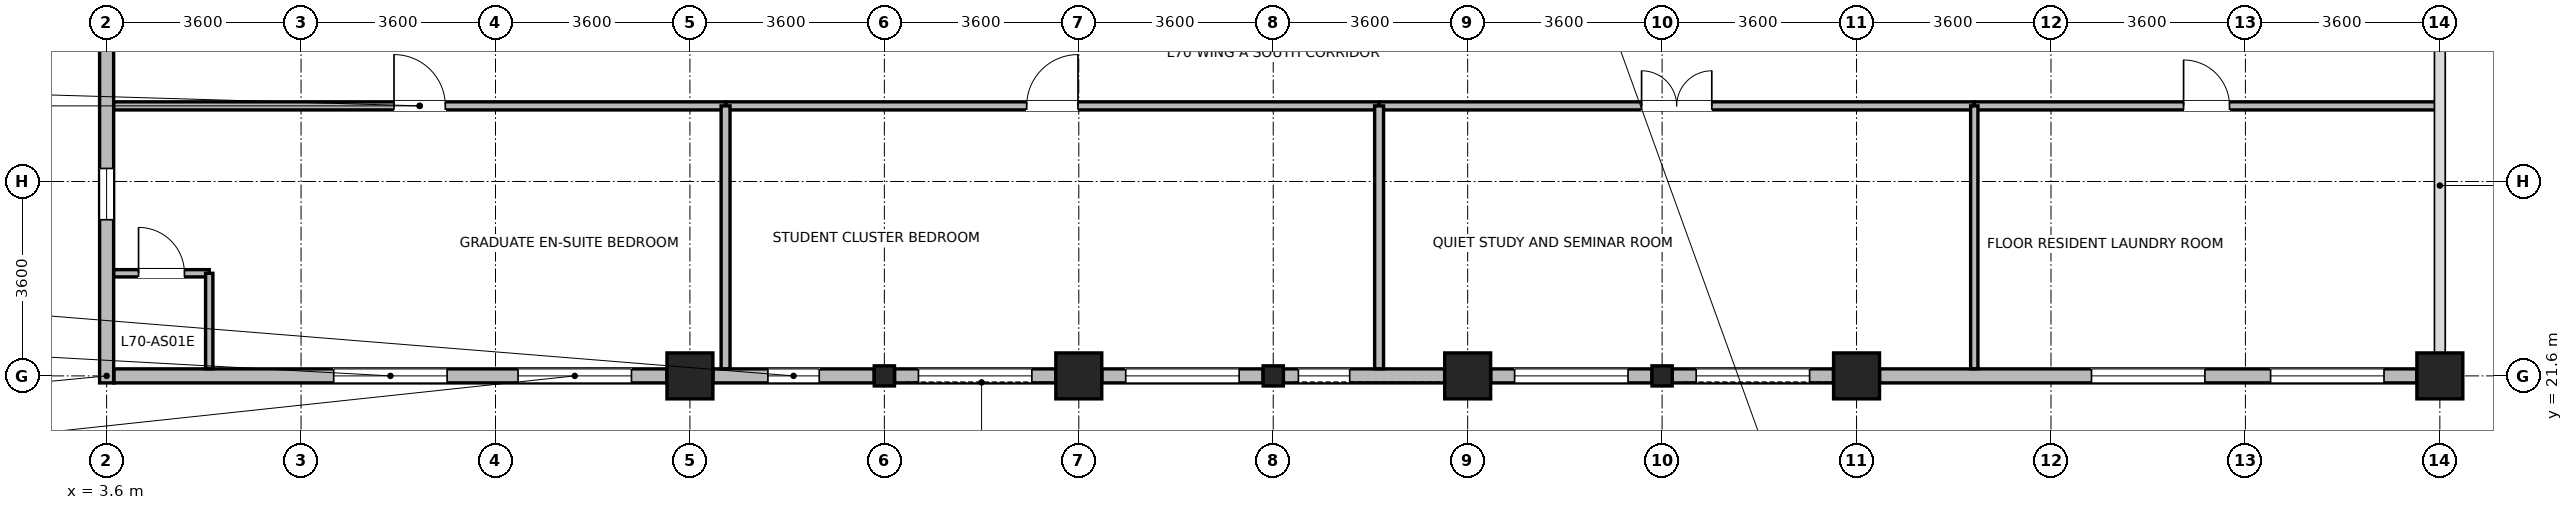
"""IFC4 building model, lengths in metres.
Left out: names, types, materials, properties, quantities, classifications, styles, units other than length and angle.
Written with IfcOpenShell. Run it as: python <this file> out.ifc"""

import sys

from ifc_helpers import new_model, si_unit, direction, frame, frame_2d, origin, origin_2d, place, context, subcontext, project, spatial, rectangle, i_section, extrude, source, transform, mapped, element, fill, save


model = new_model("IFC4")
c1 = context("Model", 3, precision=1e-05, world=origin(), true_north=direction((0.0, 1.0)))
c2 = subcontext(c1, "Body", "Model", "MODEL_VIEW")
j1 = project(units=[si_unit("LENGTHUNIT", "METRE"), si_unit("PLANEANGLEUNIT", "RADIAN")], contexts=[c1])
p1 = place(None, origin())
s1 = spatial("IfcSite", under=j1, at=p1, CompositionType="ELEMENT")
p2 = place(p1, origin())
s2 = spatial("IfcBuilding", under=s1, at=p2, CompositionType="ELEMENT")
p3 = place(p2, frame((0.0, 0.0, 272.1)))
s3 = spatial("IfcBuildingStorey", under=s2, at=p3, CompositionType="ELEMENT", Elevation=272.1)
m1 = source(origin(), c2, "Body", "SweptSolid", [
    extrude(rectangle(XDim=0.85, YDim=0.85, at=origin_2d()), origin(), (0.0, 0.0, 1.0), 3.7),
])
for number, where, z_axis, x_axis in (
    (1, (14.4, 21.6, 0.0), (0.0, 0.0, 1.0), (1.0, 0.0, 0.0)),
    (2, (21.6, 21.6, 0.0), (0.0, 0.0, 1.0), (1.0, 0.0, 0.0)),
    (3, (28.8, 21.6, 0.0), (0.0, 0.0, 1.0), (1.0, 0.0, 0.0)),
    (4, (36.0, 21.6, 0.0), (0.0, 0.0, 1.0), (1.0, 0.0, 0.0)),
    (5, (46.8, 21.6, 0.0), (0.0, 0.0, 1.0), (1.0, 0.0, 0.0)),
):
    element("IfcColumn", number, at=place(p3, frame(where, z_axis=z_axis, x_axis=x_axis)), inside=s3, PredefinedType="COLUMN", context=c2, shape_type="MappedRepresentation", body=[
        mapped(m1, transform((0.0, 0.0, 0.0), x_axis=(1.0, 0.0, 0.0), y_axis=(0.0, 1.0, 0.0), z_axis=(0.0, 0.0, 1.0), scale=1.0)),
    ])
m2 = source(origin(), c2, "Body", "SweptSolid", [
    extrude(i_section(OverallWidth=0.374, OverallDepth=0.372, WebThickness=0.015, FlangeThickness=0.026, FilletRadius=0.015, at=origin_2d()), origin(), (0.0, 0.0, 1.0), 3.7),
])
for number, where, z_axis, x_axis in (
    (6, (18.0, 21.6, 0.0), (0.0, 0.0, 1.0), (1.0, 0.0, 0.0)),
    (7, (25.2, 21.6, 0.0), (0.0, 0.0, 1.0), (1.0, 0.0, 0.0)),
    (8, (32.4, 21.6, 0.0), (0.0, 0.0, 1.0), (1.0, 0.0, 0.0)),
):
    element("IfcColumn", number, at=place(p3, frame(where, z_axis=z_axis, x_axis=x_axis)), inside=s3, PredefinedType="COLUMN", context=c2, shape_type="MappedRepresentation", body=[
        mapped(m2, transform((0.0, 0.0, 0.0), x_axis=(1.0, 0.0, 0.0), y_axis=(0.0, 1.0, 0.0), z_axis=(0.0, 0.0, 1.0), scale=1.0)),
    ])
p4 = place(p3, frame((13.974, 21.6, 0.0), z_axis=(0.0, 0.0, 1.0), x_axis=(-1.0, 0.0, 0.0)))
e9 = element("IfcWall", 9, at=p4, inside=s3, PredefinedType="STANDARD", context=c2, shape_type="SweptSolid", body=[
    extrude(rectangle(XDim=10.239, YDim=0.26, at=frame_2d((5.12, 0.0))), origin(), (0.0, 0.0, 1.0), 3.455),
])
p5 = place(p4, frame((0.656, 0.0, 0.85)))
e10 = element("IfcOpeningElement", 10, at=p5, cuts=e9, PredefinedType="OPENING", context=c2, shape_type="SweptSolid", body=[
    extrude(rectangle(XDim=2.1, YDim=1.95, at=frame_2d((1.05, 0.975))), frame((0.0, 0.14, 0.0), z_axis=(0.0, -1.0, 0.0), x_axis=(1.0, 0.0, 0.0)), (0.0, 0.0, 1.0), 0.28),
])
p6 = place(p4, frame((4.07, 0.0, 0.85)))
e11 = element("IfcOpeningElement", 11, at=p6, cuts=e9, PredefinedType="OPENING", context=c2, shape_type="SweptSolid", body=[
    extrude(rectangle(XDim=2.1, YDim=1.95, at=frame_2d((1.05, 0.975))), frame((0.0, 0.14, 0.0), z_axis=(0.0, -1.0, 0.0), x_axis=(1.0, 0.0, 0.0)), (0.0, 0.0, 1.0), 0.28),
])
p7 = place(p3, frame((17.812, 21.6, 0.0), z_axis=(0.0, 0.0, 1.0), x_axis=(-1.0, 0.0, 0.0)))
e12 = element("IfcWall", 12, at=p7, inside=s3, PredefinedType="STANDARD", context=c2, shape_type="SweptSolid", body=[
    extrude(rectangle(XDim=2.986, YDim=0.26, at=frame_2d((1.493, 0.0))), origin(), (0.0, 0.0, 1.0), 3.055),
])
p8 = place(p7, frame((1.018, 0.0, 0.85)))
e13 = element("IfcOpeningElement", 13, at=p8, cuts=e12, PredefinedType="OPENING", context=c2, shape_type="SweptSolid", body=[
    extrude(rectangle(XDim=0.95, YDim=1.75, at=frame_2d((0.475, 0.875))), frame((0.0, 0.14, 0.0), z_axis=(0.0, -1.0, 0.0), x_axis=(1.0, 0.0, 0.0)), (0.0, 0.0, 1.0), 0.28),
])
p9 = place(p3, frame((21.174, 21.6, 0.0), z_axis=(0.0, 0.0, 1.0), x_axis=(-1.0, 0.0, 0.0)))
e14 = element("IfcWall", 14, at=p9, inside=s3, PredefinedType="STANDARD", context=c2, shape_type="SweptSolid", body=[
    extrude(rectangle(XDim=2.986, YDim=0.26, at=frame_2d((1.493, 0.0))), origin(), (0.0, 0.0, 1.0), 3.055),
])
p10 = place(p9, frame((0.443, 0.0, 0.85)))
e15 = element("IfcOpeningElement", 15, at=p10, cuts=e14, PredefinedType="OPENING", context=c2, shape_type="SweptSolid", body=[
    extrude(rectangle(XDim=2.1, YDim=1.95, at=frame_2d((1.05, 0.975))), frame((0.0, 0.14, 0.0), z_axis=(0.0, -1.0, 0.0), x_axis=(1.0, 0.0, 0.0)), (0.0, 0.0, 1.0), 0.28),
])
p11 = place(p3, frame((25.012, 21.6, 0.0), z_axis=(0.0, 0.0, 1.0), x_axis=(-1.0, 0.0, 0.0)))
e16 = element("IfcWall", 16, at=p11, inside=s3, PredefinedType="STANDARD", context=c2, shape_type="SweptSolid", body=[
    extrude(rectangle(XDim=2.986, YDim=0.26, at=frame_2d((1.493, 0.0))), origin(), (0.0, 0.0, 1.0), 3.055),
])
p12 = place(p11, frame((0.443, 0.0, 0.85)))
e17 = element("IfcOpeningElement", 17, at=p12, cuts=e16, PredefinedType="OPENING", context=c2, shape_type="SweptSolid", body=[
    extrude(rectangle(XDim=2.1, YDim=1.95, at=frame_2d((1.05, 0.975))), frame((0.0, 0.14, 0.0), z_axis=(0.0, -1.0, 0.0), x_axis=(1.0, 0.0, 0.0)), (0.0, 0.0, 1.0), 0.28),
])
p13 = place(p3, frame((28.374, 21.6, 0.0), z_axis=(0.0, 0.0, 1.0), x_axis=(-1.0, 0.0, 0.0)))
e18 = element("IfcWall", 18, at=p13, inside=s3, PredefinedType="STANDARD", context=c2, shape_type="SweptSolid", body=[
    extrude(rectangle(XDim=2.986, YDim=0.26, at=frame_2d((1.493, 0.0))), origin(), (0.0, 0.0, 1.0), 3.055),
])
p14 = place(p13, frame((1.759, 0.0, 0.85)))
e19 = element("IfcOpeningElement", 19, at=p14, cuts=e18, PredefinedType="OPENING", context=c2, shape_type="SweptSolid", body=[
    extrude(rectangle(XDim=0.95, YDim=1.75, at=frame_2d((0.475, 0.875))), frame((0.0, 0.14, 0.0), z_axis=(0.0, -1.0, 0.0), x_axis=(1.0, 0.0, 0.0)), (0.0, 0.0, 1.0), 0.28),
])
p15 = place(p3, frame((32.212, 21.6, 0.0), z_axis=(0.0, 0.0, 1.0), x_axis=(-1.0, 0.0, 0.0)))
e20 = element("IfcWall", 20, at=p15, inside=s3, PredefinedType="STANDARD", context=c2, shape_type="SweptSolid", body=[
    extrude(rectangle(XDim=2.986, YDim=0.26, at=frame_2d((1.493, 0.0))), origin(), (0.0, 0.0, 1.0), 3.055),
])
p16 = place(p15, frame((0.443, 0.0, 0.85)))
e21 = element("IfcOpeningElement", 21, at=p16, cuts=e20, PredefinedType="OPENING", context=c2, shape_type="SweptSolid", body=[
    extrude(rectangle(XDim=2.1, YDim=1.95, at=frame_2d((1.05, 0.975))), frame((0.0, 0.14, 0.0), z_axis=(0.0, -1.0, 0.0), x_axis=(1.0, 0.0, 0.0)), (0.0, 0.0, 1.0), 0.28),
])
p17 = place(p3, frame((35.574, 21.6, 0.0), z_axis=(0.0, 0.0, 1.0), x_axis=(-1.0, 0.0, 0.0)))
e22 = element("IfcWall", 22, at=p17, inside=s3, PredefinedType="STANDARD", context=c2, shape_type="SweptSolid", body=[
    extrude(rectangle(XDim=2.986, YDim=0.26, at=frame_2d((1.493, 0.0))), origin(), (0.0, 0.0, 1.0), 3.055),
])
p18 = place(p17, frame((0.443, 0.0, 0.85)))
e23 = element("IfcOpeningElement", 23, at=p18, cuts=e22, PredefinedType="OPENING", context=c2, shape_type="SweptSolid", body=[
    extrude(rectangle(XDim=2.1, YDim=1.95, at=frame_2d((1.05, 0.975))), frame((0.0, 0.14, 0.0), z_axis=(0.0, -1.0, 0.0), x_axis=(1.0, 0.0, 0.0)), (0.0, 0.0, 1.0), 0.28),
])
p19 = place(p3, frame((46.374, 21.6, 0.0), z_axis=(0.0, 0.0, 1.0), x_axis=(-1.0, 0.0, 0.0)))
e24 = element("IfcWall", 24, at=p19, inside=s3, PredefinedType="STANDARD", context=c2, shape_type="SweptSolid", body=[
    extrude(rectangle(XDim=9.948, YDim=0.26, at=frame_2d((4.974, 0.0))), origin(), (0.0, 0.0, 1.0), 3.055),
])
p20 = place(p19, frame((0.608, 0.0, 0.85)))
e25 = element("IfcOpeningElement", 25, at=p20, cuts=e24, PredefinedType="OPENING", context=c2, shape_type="SweptSolid", body=[
    extrude(rectangle(XDim=2.1, YDim=1.95, at=frame_2d((1.05, 0.975))), frame((0.0, 0.14, 0.0), z_axis=(0.0, -1.0, 0.0), x_axis=(1.0, 0.0, 0.0)), (0.0, 0.0, 1.0), 0.28),
])
p21 = place(p19, frame((3.924, 0.0, 0.85)))
e26 = element("IfcOpeningElement", 26, at=p21, cuts=e24, PredefinedType="OPENING", context=c2, shape_type="SweptSolid", body=[
    extrude(rectangle(XDim=2.1, YDim=1.95, at=frame_2d((1.05, 0.975))), frame((0.0, 0.14, 0.0), z_axis=(0.0, -1.0, 0.0), x_axis=(1.0, 0.0, 0.0)), (0.0, 0.0, 1.0), 0.28),
])
p22 = place(p3, frame((3.6, 21.47, 0.0), z_axis=(0.0, 0.0, 1.0), x_axis=(0.0, 1.0, 0.0)))
e27 = element("IfcWall", 27, at=p22, inside=s3, PredefinedType="STANDARD", context=c2, shape_type="SweptSolid", body=[
    extrude(rectangle(XDim=6.993, YDim=0.26, at=frame_2d((3.497, 0.0))), origin(), (0.0, 0.0, 1.0), 3.455),
])
p23 = place(p22, frame((3.021, 0.0, 0.85)))
e28 = element("IfcOpeningElement", 28, at=p23, cuts=e27, PredefinedType="OPENING", context=c2, shape_type="SweptSolid", body=[
    extrude(rectangle(XDim=0.95, YDim=1.75, at=frame_2d((0.475, 0.875))), frame((0.0, 0.14, 0.0), z_axis=(0.0, -1.0, 0.0), x_axis=(1.0, 0.0, 0.0)), (0.0, 0.0, 1.0), 0.28),
])
p24 = place(p3, frame((3.732, 23.5, 0.0), z_axis=(0.0, 0.0, 1.0), x_axis=(1.0, 0.0, 0.0)))
e29 = element("IfcWall", 29, at=p24, inside=s3, PredefinedType="PARTITIONING", context=c2, shape_type="SweptSolid", body=[
    extrude(rectangle(XDim=1.768, YDim=0.135, at=frame_2d((0.884, 0.0))), origin(), (0.0, 0.0, 1.0), 3.455),
])
p25 = place(p24, frame((0.459, 0.0, 0.0)))
e30 = element("IfcOpeningElement", 30, at=p25, cuts=e29, PredefinedType="OPENING", context=c2, shape_type="SweptSolid", body=[
    extrude(rectangle(XDim=0.85, YDim=2.04, at=frame_2d((0.425, 1.02))), frame((0.0, 0.078, 0.0), z_axis=(0.0, -1.0, 0.0), x_axis=(1.0, 0.0, 0.0)), (0.0, 0.0, 1.0), 0.155),
])
p26 = place(p3, frame((5.5, 21.732, 0.0), z_axis=(0.0, 0.0, 1.0), x_axis=(0.0, 1.0, 0.0)))
e31 = element("IfcWall", 31, at=p26, inside=s3, PredefinedType="PARTITIONING", context=c2, shape_type="SweptSolid", body=[
    extrude(rectangle(XDim=1.768, YDim=0.135, at=frame_2d((0.884, 0.0))), origin(), (0.0, 0.0, 1.0), 3.455),
])
p27 = place(p3, frame((15.06, 26.6, 0.0), z_axis=(0.0, 0.0, 1.0), x_axis=(1.0, 0.0, 0.0)))
e32 = element("IfcWall", 32, at=p27, inside=s3, PredefinedType="PARTITIONING", context=c2, shape_type="SweptSolid", body=[
    extrude(rectangle(XDim=12.1, YDim=0.15, at=frame_2d((6.05, 0.0))), origin(), (0.0, 0.0, 1.0), 3.455),
])
p28 = place(p27, frame((5.575, 0.0, 0.0)))
e33 = element("IfcOpeningElement", 33, at=p28, cuts=e32, PredefinedType="OPENING", context=c2, shape_type="SweptSolid", body=[
    extrude(rectangle(XDim=0.95, YDim=2.1, at=frame_2d((0.475, 1.05))), frame((0.0, 0.085, 0.0), z_axis=(0.0, -1.0, 0.0), x_axis=(1.0, 0.0, 0.0)), (0.0, 0.0, 1.0), 0.17),
])
p29 = place(p3, frame((3.732, 26.6, 0.0), z_axis=(0.0, 0.0, 1.0), x_axis=(1.0, 0.0, 0.0)))
e34 = element("IfcWall", 34, at=p29, inside=s3, PredefinedType="PARTITIONING", context=c2, shape_type="SweptSolid", body=[
    extrude(rectangle(XDim=11.328, YDim=0.15, at=frame_2d((5.664, 0.0))), origin(), (0.0, 0.0, 1.0), 3.455),
])
p30 = place(p29, frame((5.189, 0.0, 0.0)))
e35 = element("IfcOpeningElement", 35, at=p30, cuts=e34, PredefinedType="OPENING", context=c2, shape_type="SweptSolid", body=[
    extrude(rectangle(XDim=0.95, YDim=2.1, at=frame_2d((0.475, 1.05))), frame((0.0, 0.085, 0.0), z_axis=(0.0, -1.0, 0.0), x_axis=(1.0, 0.0, 0.0)), (0.0, 0.0, 1.0), 0.17),
])
p31 = place(p3, frame((27.16, 26.6, 0.0), z_axis=(0.0, 0.0, 1.0), x_axis=(1.0, 0.0, 0.0)))
e36 = element("IfcWall", 36, at=p31, inside=s3, PredefinedType="PARTITIONING", context=c2, shape_type="SweptSolid", body=[
    extrude(rectangle(XDim=11.02, YDim=0.15, at=frame_2d((5.51, 0.0))), origin(), (0.0, 0.0, 1.0), 3.455),
])
p32 = place(p31, frame((4.86, 0.0, 0.0)))
e37 = element("IfcOpeningElement", 37, at=p32, cuts=e36, PredefinedType="OPENING", context=c2, shape_type="SweptSolid", body=[
    extrude(rectangle(XDim=1.3, YDim=2.12, at=frame_2d((0.65, 1.06))), frame((0.0, 0.085, 0.0), z_axis=(0.0, -1.0, 0.0), x_axis=(1.0, 0.0, 0.0)), (0.0, 0.0, 1.0), 0.17),
])
p33 = place(p3, frame((38.18, 26.6, 0.0), z_axis=(0.0, 0.0, 1.0), x_axis=(1.0, 0.0, 0.0)))
e38 = element("IfcWall", 38, at=p33, inside=s3, PredefinedType="PARTITIONING", context=c2, shape_type="SweptSolid", body=[
    extrude(rectangle(XDim=8.6, YDim=0.15, at=frame_2d((4.3, 0.0))), origin(), (0.0, 0.0, 1.0), 3.455),
])
p34 = place(p33, frame((3.875, 0.0, 0.0)))
e39 = element("IfcOpeningElement", 39, at=p34, cuts=e38, PredefinedType="OPENING", context=c2, shape_type="SweptSolid", body=[
    extrude(rectangle(XDim=0.85, YDim=2.04, at=frame_2d((0.425, 1.02))), frame((0.0, 0.085, 0.0), z_axis=(0.0, -1.0, 0.0), x_axis=(1.0, 0.0, 0.0)), (0.0, 0.0, 1.0), 0.17),
])
for number, where, z_axis, x_axis in (
    (40, (15.06, 21.732, 0.0), (0.0, 0.0, 1.0), (0.0, 1.0, 0.0)),
    (41, (27.16, 21.732, 0.0), (0.0, 0.0, 1.0), (0.0, 1.0, 0.0)),
):
    element("IfcWall", number, at=place(p3, frame(where, z_axis=z_axis, x_axis=x_axis)), inside=s3, PredefinedType="PARTITIONING", context=c2, shape_type="SweptSolid", body=[
        extrude(rectangle(XDim=4.868, YDim=0.165, at=frame_2d((2.434, 0.0))), origin(), (0.0, 0.0, 1.0), 3.455),
    ])
p35 = place(p3, frame((38.18, 21.732, 0.0), z_axis=(0.0, 0.0, 1.0), x_axis=(0.0, 1.0, 0.0)))
e42 = element("IfcWall", 42, at=p35, inside=s3, PredefinedType="PARTITIONING", context=c2, shape_type="SweptSolid", body=[
    extrude(rectangle(XDim=4.868, YDim=0.135, at=frame_2d((2.434, 0.0))), origin(), (0.0, 0.0, 1.0), 3.455),
])
p36 = place(p5, origin())
e43 = element("IfcWindow", 43, at=p36, inside=s3, PartitioningType="SINGLE_PANEL", PredefinedType="WINDOW", context=c2, shape_type="SweptSolid", body=[
    extrude(rectangle(XDim=2.1, YDim=1.95, at=frame_2d((1.05, 0.975))), frame((0.0, 0.03, 0.0), z_axis=(0.0, -1.0, 0.0), x_axis=(1.0, 0.0, 0.0)), (0.0, 0.0, 1.0), 0.06),
])
fill(e10, e43)
p37 = place(p6, origin())
e44 = element("IfcWindow", 44, at=p37, inside=s3, PartitioningType="SINGLE_PANEL", PredefinedType="WINDOW", context=c2, shape_type="SweptSolid", body=[
    extrude(rectangle(XDim=2.1, YDim=1.95, at=frame_2d((1.05, 0.975))), frame((0.0, 0.03, 0.0), z_axis=(0.0, -1.0, 0.0), x_axis=(1.0, 0.0, 0.0)), (0.0, 0.0, 1.0), 0.06),
])
fill(e11, e44)
p38 = place(p8, origin())
e45 = element("IfcWindow", 45, at=p38, inside=s3, PartitioningType="SINGLE_PANEL", PredefinedType="WINDOW", context=c2, shape_type="SweptSolid", body=[
    extrude(rectangle(XDim=0.95, YDim=1.75, at=frame_2d((0.475, 0.875))), frame((0.0, 0.03, 0.0), z_axis=(0.0, -1.0, 0.0), x_axis=(1.0, 0.0, 0.0)), (0.0, 0.0, 1.0), 0.06),
])
fill(e13, e45)
p39 = place(p10, origin())
e46 = element("IfcWindow", 46, at=p39, inside=s3, PartitioningType="SINGLE_PANEL", PredefinedType="WINDOW", context=c2, shape_type="SweptSolid", body=[
    extrude(rectangle(XDim=2.1, YDim=1.95, at=frame_2d((1.05, 0.975))), frame((0.0, 0.03, 0.0), z_axis=(0.0, -1.0, 0.0), x_axis=(1.0, 0.0, 0.0)), (0.0, 0.0, 1.0), 0.06),
])
fill(e15, e46)
p40 = place(p12, origin())
e47 = element("IfcWindow", 47, at=p40, inside=s3, PartitioningType="SINGLE_PANEL", PredefinedType="WINDOW", context=c2, shape_type="SweptSolid", body=[
    extrude(rectangle(XDim=2.1, YDim=1.95, at=frame_2d((1.05, 0.975))), frame((0.0, 0.03, 0.0), z_axis=(0.0, -1.0, 0.0), x_axis=(1.0, 0.0, 0.0)), (0.0, 0.0, 1.0), 0.06),
])
fill(e17, e47)
p41 = place(p14, origin())
e48 = element("IfcWindow", 48, at=p41, inside=s3, PartitioningType="SINGLE_PANEL", PredefinedType="WINDOW", context=c2, shape_type="SweptSolid", body=[
    extrude(rectangle(XDim=0.95, YDim=1.75, at=frame_2d((0.475, 0.875))), frame((0.0, 0.03, 0.0), z_axis=(0.0, -1.0, 0.0), x_axis=(1.0, 0.0, 0.0)), (0.0, 0.0, 1.0), 0.06),
])
fill(e19, e48)
p42 = place(p16, origin())
e49 = element("IfcWindow", 49, at=p42, inside=s3, PartitioningType="SINGLE_PANEL", PredefinedType="WINDOW", context=c2, shape_type="SweptSolid", body=[
    extrude(rectangle(XDim=2.1, YDim=1.95, at=frame_2d((1.05, 0.975))), frame((0.0, 0.03, 0.0), z_axis=(0.0, -1.0, 0.0), x_axis=(1.0, 0.0, 0.0)), (0.0, 0.0, 1.0), 0.06),
])
fill(e21, e49)
p43 = place(p18, origin())
e50 = element("IfcWindow", 50, at=p43, inside=s3, PartitioningType="SINGLE_PANEL", PredefinedType="WINDOW", context=c2, shape_type="SweptSolid", body=[
    extrude(rectangle(XDim=2.1, YDim=1.95, at=frame_2d((1.05, 0.975))), frame((0.0, 0.03, 0.0), z_axis=(0.0, -1.0, 0.0), x_axis=(1.0, 0.0, 0.0)), (0.0, 0.0, 1.0), 0.06),
])
fill(e23, e50)
p44 = place(p20, origin())
e51 = element("IfcWindow", 51, at=p44, inside=s3, PartitioningType="SINGLE_PANEL", PredefinedType="WINDOW", context=c2, shape_type="SweptSolid", body=[
    extrude(rectangle(XDim=2.1, YDim=1.95, at=frame_2d((1.05, 0.975))), frame((0.0, 0.03, 0.0), z_axis=(0.0, -1.0, 0.0), x_axis=(1.0, 0.0, 0.0)), (0.0, 0.0, 1.0), 0.06),
])
fill(e25, e51)
p45 = place(p21, origin())
e52 = element("IfcWindow", 52, at=p45, inside=s3, PartitioningType="SINGLE_PANEL", PredefinedType="WINDOW", context=c2, shape_type="SweptSolid", body=[
    extrude(rectangle(XDim=2.1, YDim=1.95, at=frame_2d((1.05, 0.975))), frame((0.0, 0.03, 0.0), z_axis=(0.0, -1.0, 0.0), x_axis=(1.0, 0.0, 0.0)), (0.0, 0.0, 1.0), 0.06),
])
fill(e26, e52)
p46 = place(p23, origin())
e53 = element("IfcWindow", 53, at=p46, inside=s3, PartitioningType="SINGLE_PANEL", PredefinedType="WINDOW", context=c2, shape_type="SweptSolid", body=[
    extrude(rectangle(XDim=0.95, YDim=1.75, at=frame_2d((0.475, 0.875))), frame((0.0, 0.03, 0.0), z_axis=(0.0, -1.0, 0.0), x_axis=(1.0, 0.0, 0.0)), (0.0, 0.0, 1.0), 0.06),
])
fill(e28, e53)
p47 = place(p25, origin())
e54 = element("IfcDoor", 54, at=p47, inside=s3, OperationType="SINGLE_SWING_LEFT", PredefinedType="DOOR", context=c2, shape_type="SweptSolid", body=[
    extrude(rectangle(XDim=0.85, YDim=2.04, at=frame_2d((0.425, 1.02))), frame((0.0, 0.025, 0.0), z_axis=(0.0, -1.0, 0.0), x_axis=(1.0, 0.0, 0.0)), (0.0, 0.0, 1.0), 0.05),
])
fill(e30, e54)
p48 = place(p28, origin())
e55 = element("IfcDoor", 55, at=p48, inside=s3, OperationType="SINGLE_SWING_RIGHT", PredefinedType="DOOR", context=c2, shape_type="SweptSolid", body=[
    extrude(rectangle(XDim=0.95, YDim=2.1, at=frame_2d((0.475, 1.05))), frame((0.0, 0.025, 0.0), z_axis=(0.0, -1.0, 0.0), x_axis=(1.0, 0.0, 0.0)), (0.0, 0.0, 1.0), 0.05),
])
fill(e33, e55)
p49 = place(p30, origin())
e56 = element("IfcDoor", 56, at=p49, inside=s3, OperationType="SINGLE_SWING_LEFT", PredefinedType="DOOR", context=c2, shape_type="SweptSolid", body=[
    extrude(rectangle(XDim=0.95, YDim=2.1, at=frame_2d((0.475, 1.05))), frame((0.0, 0.025, 0.0), z_axis=(0.0, -1.0, 0.0), x_axis=(1.0, 0.0, 0.0)), (0.0, 0.0, 1.0), 0.05),
])
fill(e35, e56)
p50 = place(p32, origin())
e57 = element("IfcDoor", 57, at=p50, inside=s3, OperationType="DOUBLE_DOOR_SINGLE_SWING", PredefinedType="DOOR", context=c2, shape_type="SweptSolid", body=[
    extrude(rectangle(XDim=1.3, YDim=2.12, at=frame_2d((0.65, 1.06))), frame((0.0, 0.025, 0.0), z_axis=(0.0, -1.0, 0.0), x_axis=(1.0, 0.0, 0.0)), (0.0, 0.0, 1.0), 0.05),
])
fill(e37, e57)
p51 = place(p34, origin())
e58 = element("IfcDoor", 58, at=p51, inside=s3, OperationType="SINGLE_SWING_LEFT", PredefinedType="DOOR", context=c2, shape_type="SweptSolid", body=[
    extrude(rectangle(XDim=0.85, YDim=2.04, at=frame_2d((0.425, 1.02))), frame((0.0, 0.025, 0.0), z_axis=(0.0, -1.0, 0.0), x_axis=(1.0, 0.0, 0.0)), (0.0, 0.0, 1.0), 0.05),
])
fill(e39, e58)
save(model, sys.argv[1])
